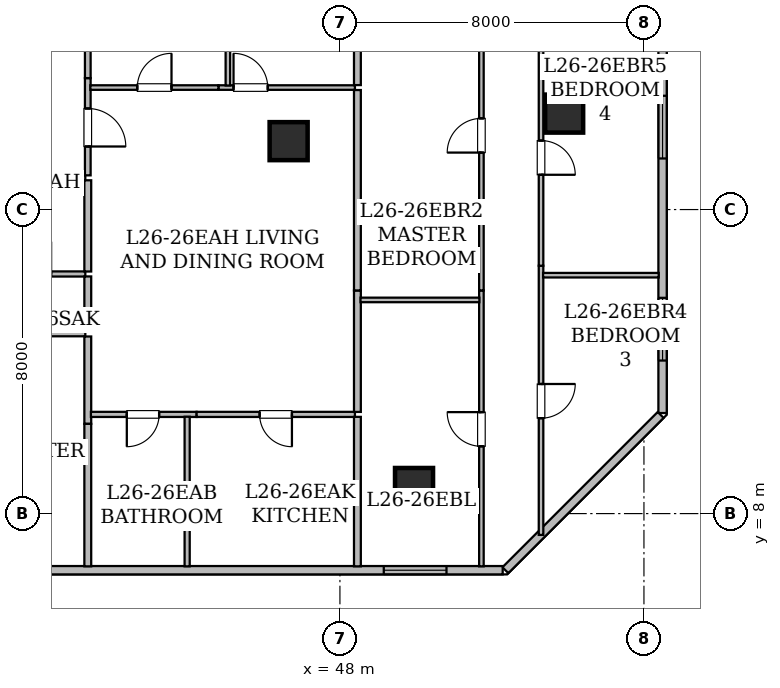
"""IFC4 building model, lengths in metres.
Left out: names, types, materials, properties, quantities, classifications, styles, units other than length and angle.
Written with IfcOpenShell. Run it as: python <this file> out.ifc"""

import sys

from ifc_helpers import new_model, si_unit, direction, frame, frame_2d, origin, origin_2d, place, context, subcontext, project, spatial, rectangle, hollow_rectangle, extrude, element, fill, save


model = new_model("IFC4")
c1 = context("Model", 3, precision=1e-05, world=origin(), true_north=direction((0.0, 1.0)))
c2 = subcontext(c1, "Body", "Model", "MODEL_VIEW")
j1 = project(units=[si_unit("LENGTHUNIT", "METRE"), si_unit("PLANEANGLEUNIT", "RADIAN")], contexts=[c1])
p1 = place(None, origin())
s1 = spatial("IfcSite", under=j1, at=p1, CompositionType="ELEMENT")
p2 = place(p1, origin())
s2 = spatial("IfcBuilding", under=s1, at=p2, CompositionType="ELEMENT")
p3 = place(p2, frame((0.0, 0.0, 105.55)))
s3 = spatial("IfcBuildingStorey", under=s2, at=p3, CompositionType="ELEMENT", Elevation=105.55)
for number, where, z_axis, x_axis in (
    (1, (49.95, 8.7, 0.0), (0.0, 0.0, 1.0), (1.0, 0.0, 0.0)),
    (2, (53.9, 18.525, 0.0), (0.0, 0.0, 1.0), (1.0, 0.0, 0.0)),
    (3, (46.65, 17.8, 0.0), (0.0, 0.0, 1.0), (1.0, 0.0, 0.0)),
):
    element("IfcColumn", number, at=place(p3, frame(where, z_axis=z_axis, x_axis=x_axis)), inside=s3, PredefinedType="COLUMN", context=c2, shape_type="SweptSolid", body=[
        extrude(hollow_rectangle(XDim=1.0, YDim=1.0, WallThickness=0.05, at=origin_2d()), origin(), (0.0, 0.0, 1.0), 3.65),
    ])
p4 = place(p3, frame((56.49, 24.707, 0.0), z_axis=(0.0, 0.0, 1.0), x_axis=(0.0, -1.0, 0.0)))
e4 = element("IfcWall", 4, at=p4, inside=s3, PredefinedType="STANDARD", context=c2, shape_type="SweptSolid", body=[
    extrude(rectangle(XDim=14.061, YDim=0.22, at=frame_2d((7.031, 0.0))), origin(), (0.0, 0.0, 1.0), 3.43),
])
p5 = place(p4, frame((11.03, 0.0, 0.85)))
e5 = element("IfcOpeningElement", 5, at=p5, cuts=e4, PredefinedType="OPENING", context=c2, shape_type="SweptSolid", body=[
    extrude(rectangle(XDim=1.65, YDim=1.55, at=frame_2d((0.825, 0.775))), frame((0.0, 0.12, 0.0), z_axis=(0.0, -1.0, 0.0), x_axis=(1.0, 0.0, 0.0)), (0.0, 0.0, 1.0), 0.24),
])
p6 = place(p4, frame((5.713, 0.0, 0.85)))
e6 = element("IfcOpeningElement", 6, at=p6, cuts=e4, PredefinedType="OPENING", context=c2, shape_type="SweptSolid", body=[
    extrude(rectangle(XDim=1.65, YDim=1.55, at=frame_2d((0.825, 0.775))), frame((0.0, 0.12, 0.0), z_axis=(0.0, -1.0, 0.0), x_axis=(1.0, 0.0, 0.0)), (0.0, 0.0, 1.0), 0.24),
])
p7 = place(p4, frame((0.638, 0.0, 0.85)))
e7 = element("IfcOpeningElement", 7, at=p7, cuts=e4, PredefinedType="OPENING", context=c2, shape_type="SweptSolid", body=[
    extrude(rectangle(XDim=1.65, YDim=1.55, at=frame_2d((0.825, 0.775))), frame((0.0, 0.12, 0.0), z_axis=(0.0, -1.0, 0.0), x_axis=(1.0, 0.0, 0.0)), (0.0, 0.0, 1.0), 0.24),
])
p8 = place(p3, frame((56.44, 10.596, 0.0), z_axis=(0.0, 0.0, 1.0), x_axis=(-0.707106781187, -0.707106781187, 0.0)))
e8 = element("IfcWall", 8, at=p8, inside=s3, PredefinedType="STANDARD", context=c2, shape_type="SweptSolid", body=[
    extrude(rectangle(XDim=5.778, YDim=0.22, at=frame_2d((2.889, 0.0))), origin(), (0.0, 0.0, 1.0), 3.43),
])
p9 = place(p3, frame((52.283, 6.51, 0.0), z_axis=(0.0, 0.0, 1.0), x_axis=(-1.0, 0.0, 0.0)))
e9 = element("IfcWall", 9, at=p9, inside=s3, PredefinedType="STANDARD", context=c2, shape_type="SweptSolid", body=[
    extrude(rectangle(XDim=38.568, YDim=0.22, at=frame_2d((19.284, 0.0))), origin(), (0.0, 0.0, 1.0), 3.43),
])
p10 = place(p9, frame((21.108, 0.0, 0.85)))
e10 = element("IfcOpeningElement", 10, at=p10, cuts=e9, PredefinedType="OPENING", context=c2, shape_type="SweptSolid", body=[
    extrude(rectangle(XDim=1.65, YDim=1.55, at=frame_2d((0.825, 0.775))), frame((0.0, 0.12, 0.0), z_axis=(0.0, -1.0, 0.0), x_axis=(1.0, 0.0, 0.0)), (0.0, 0.0, 1.0), 0.24),
])
p11 = place(p9, frame((35.355, 0.0, 0.85)))
e11 = element("IfcOpeningElement", 11, at=p11, cuts=e9, PredefinedType="OPENING", context=c2, shape_type="SweptSolid", body=[
    extrude(rectangle(XDim=1.65, YDim=1.55, at=frame_2d((0.825, 0.775))), frame((0.0, 0.12, 0.0), z_axis=(0.0, -1.0, 0.0), x_axis=(1.0, 0.0, 0.0)), (0.0, 0.0, 1.0), 0.24),
])
p12 = place(p9, frame((29.413, 0.0, 0.8)))
e12 = element("IfcOpeningElement", 12, at=p12, cuts=e9, PredefinedType="OPENING", context=c2, shape_type="SweptSolid", body=[
    extrude(rectangle(XDim=1.2, YDim=1.5, at=frame_2d((0.6, 0.75))), frame((0.0, 0.12, 0.0), z_axis=(0.0, -1.0, 0.0), x_axis=(1.0, 0.0, 0.0)), (0.0, 0.0, 1.0), 0.24),
])
p13 = place(p9, frame((31.863, 0.0, 0.85)))
e13 = element("IfcOpeningElement", 13, at=p13, cuts=e9, PredefinedType="OPENING", context=c2, shape_type="SweptSolid", body=[
    extrude(rectangle(XDim=1.65, YDim=1.55, at=frame_2d((0.825, 0.775))), frame((0.0, 0.12, 0.0), z_axis=(0.0, -1.0, 0.0), x_axis=(1.0, 0.0, 0.0)), (0.0, 0.0, 1.0), 0.24),
])
p14 = place(p9, frame((26.513, 0.0, 0.85)))
e14 = element("IfcOpeningElement", 14, at=p14, cuts=e9, PredefinedType="OPENING", context=c2, shape_type="SweptSolid", body=[
    extrude(rectangle(XDim=1.65, YDim=1.55, at=frame_2d((0.825, 0.775))), frame((0.0, 0.12, 0.0), z_axis=(0.0, -1.0, 0.0), x_axis=(1.0, 0.0, 0.0)), (0.0, 0.0, 1.0), 0.24),
])
p15 = place(p9, frame((13.843, 0.0, 0.85)))
e15 = element("IfcOpeningElement", 15, at=p15, cuts=e9, PredefinedType="OPENING", context=c2, shape_type="SweptSolid", body=[
    extrude(rectangle(XDim=1.65, YDim=1.55, at=frame_2d((0.825, 0.775))), frame((0.0, 0.12, 0.0), z_axis=(0.0, -1.0, 0.0), x_axis=(1.0, 0.0, 0.0)), (0.0, 0.0, 1.0), 0.24),
])
p16 = place(p9, frame((1.479, 0.0, 0.85)))
e16 = element("IfcOpeningElement", 16, at=p16, cuts=e9, PredefinedType="OPENING", context=c2, shape_type="SweptSolid", body=[
    extrude(rectangle(XDim=1.65, YDim=1.55, at=frame_2d((0.825, 0.775))), frame((0.0, 0.12, 0.0), z_axis=(0.0, -1.0, 0.0), x_axis=(1.0, 0.0, 0.0)), (0.0, 0.0, 1.0), 0.24),
])
p17 = place(p3, frame((41.3, 16.835, 0.0), z_axis=(0.0, 0.0, 1.0), x_axis=(-1.0, 0.0, 0.0)))
e17 = element("IfcWall", 17, at=p17, inside=s3, PredefinedType="STANDARD", context=c2, shape_type="SweptSolid", body=[
    extrude(rectangle(XDim=2.336, YDim=0.15, at=frame_2d((1.168, 0.0))), origin(), (0.0, 0.0, 1.0), 2.647),
])
p18 = place(p3, frame((41.365, 19.459, 0.0), z_axis=(0.0, 0.0, 1.0), x_axis=(0.0, -1.0, 0.0)))
e18 = element("IfcWall", 18, at=p18, inside=s3, PredefinedType="STANDARD", context=c2, shape_type="SweptSolid", body=[
    extrude(rectangle(XDim=2.559, YDim=0.15, at=frame_2d((1.28, 0.0))), origin(), (0.0, 0.0, 1.0), 2.647),
])
p19 = place(p18, frame((0.8, 0.0, 0.0)))
e19 = element("IfcOpeningElement", 19, at=p19, cuts=e18, PredefinedType="OPENING", context=c2, shape_type="SweptSolid", body=[
    extrude(rectangle(XDim=1.0, YDim=2.15, at=frame_2d((0.5, 1.075))), frame((0.0, 0.085, 0.0), z_axis=(0.0, -1.0, 0.0), x_axis=(1.0, 0.0, 0.0)), (0.0, 0.0, 1.0), 0.17),
])
p20 = place(p3, frame((41.365, 32.048, 0.0), z_axis=(0.0, 0.0, 1.0), x_axis=(0.0, -1.0, 0.0)))
e20 = element("IfcWall", 20, at=p20, inside=s3, PredefinedType="STANDARD", context=c2, shape_type="SweptSolid", body=[
    extrude(rectangle(XDim=12.589, YDim=0.15, at=frame_2d((6.294, 0.0))), origin(), (0.0, 0.0, 1.0), 2.961),
])
p21 = place(p3, frame((38.65, 14.305, 0.0), z_axis=(0.0, 0.0, 1.0), x_axis=(1.0, 0.0, 0.0)))
e21 = element("IfcWall", 21, at=p21, inside=s3, PredefinedType="PARTITIONING", context=c2, shape_type="SweptSolid", body=[
    extrude(rectangle(XDim=2.65, YDim=0.135, at=frame_2d((1.325, 0.0))), origin(), (0.0, 0.0, 1.0), 2.647),
])
p22 = place(p21, frame((0.9, 0.0, 0.0)))
e22 = element("IfcOpeningElement", 22, at=p22, cuts=e21, PredefinedType="OPENING", context=c2, shape_type="SweptSolid", body=[
    extrude(rectangle(XDim=0.85, YDim=2.1, at=frame_2d((0.425, 1.05))), frame((0.0, 0.077, 0.0), z_axis=(0.0, -1.0, 0.0), x_axis=(1.0, 0.0, 0.0)), (0.0, 0.0, 1.0), 0.155),
])
p23 = place(p3, frame((41.3, 12.725, 0.0), z_axis=(0.0, 0.0, 1.0), x_axis=(-1.0, 0.0, 0.0)))
e23 = element("IfcWall", 23, at=p23, inside=s3, PredefinedType="PARTITIONING", context=c2, shape_type="SweptSolid", body=[
    extrude(rectangle(XDim=7.381, YDim=0.12, at=frame_2d((3.69, 0.0))), origin(), (0.0, 0.0, 1.0), 2.647),
])
p24 = place(p23, frame((3.24, 0.0, 0.0)))
e24 = element("IfcOpeningElement", 24, at=p24, cuts=e23, PredefinedType="OPENING", context=c2, shape_type="SweptSolid", body=[
    extrude(rectangle(XDim=0.9, YDim=2.1, at=frame_2d((0.45, 1.05))), frame((0.0, 0.07, 0.0), z_axis=(0.0, -1.0, 0.0), x_axis=(1.0, 0.0, 0.0)), (0.0, 0.0, 1.0), 0.14),
])
p25 = place(p3, frame((41.365, 14.24, 0.0), z_axis=(0.0, 0.0, 1.0), x_axis=(0.0, -1.0, 0.0)))
e25 = element("IfcWall", 25, at=p25, inside=s3, PredefinedType="STANDARD", context=c2, shape_type="SweptSolid", body=[
    extrude(rectangle(XDim=1.45, YDim=0.18, at=frame_2d((0.725, 0.0))), origin(), (0.0, 0.0, 1.0), 3.43),
])
p26 = place(p3, frame((41.365, 16.77, 0.0), z_axis=(0.0, 0.0, 1.0), x_axis=(0.0, -1.0, 0.0)))
e26 = element("IfcWall", 26, at=p26, inside=s3, PredefinedType="STANDARD", context=c2, shape_type="SweptSolid", body=[
    extrude(rectangle(XDim=2.4, YDim=0.18, at=frame_2d((1.2, 0.0))), origin(), (0.0, 0.0, 1.0), 3.43),
])
p27 = place(p3, frame((41.365, 12.66, 0.0), z_axis=(0.0, 0.0, 1.0), x_axis=(0.0, -1.0, 0.0)))
e27 = element("IfcWall", 27, at=p27, inside=s3, PredefinedType="STANDARD", context=c2, shape_type="SweptSolid", body=[
    extrude(rectangle(XDim=2.299, YDim=0.18, at=frame_2d((1.149, 0.0))), origin(), (0.0, 0.0, 1.0), 3.43),
])
p28 = place(p3, frame((41.365, 10.361, 0.0), z_axis=(0.0, 0.0, 1.0), x_axis=(0.0, -1.0, 0.0)))
e28 = element("IfcWall", 28, at=p28, inside=s3, PredefinedType="STANDARD", context=c2, shape_type="SweptSolid", body=[
    extrude(rectangle(XDim=3.749, YDim=0.18, at=frame_2d((1.875, 0.0))), origin(), (0.0, 0.0, 1.0), 2.876),
])
p29 = place(p3, frame((44.803, 19.21, 0.0), z_axis=(0.0, 0.0, 1.0), x_axis=(1.0, 0.0, 0.0)))
e29 = element("IfcWall", 29, at=p29, inside=s3, PredefinedType="PARTITIONING", context=c2, shape_type="SweptSolid", body=[
    extrude(rectangle(XDim=3.592, YDim=0.12, at=frame_2d((1.796, 0.0))), origin(), (0.0, 0.0, 1.0), 2.647),
])
p30 = place(p29, frame((0.397, 0.0, 0.0)))
e30 = element("IfcOpeningElement", 30, at=p30, cuts=e29, PredefinedType="OPENING", context=c2, shape_type="SweptSolid", body=[
    extrude(rectangle(XDim=0.9, YDim=2.1, at=frame_2d((0.45, 1.05))), frame((0.0, 0.07, 0.0), z_axis=(0.0, -1.0, 0.0), x_axis=(1.0, 0.0, 0.0)), (0.0, 0.0, 1.0), 0.14),
])
p31 = place(p3, frame((44.229, 10.61, 0.0), z_axis=(0.0, 0.0, 1.0), x_axis=(-1.0, 0.0, 0.0)))
e31 = element("IfcWall", 31, at=p31, inside=s3, PredefinedType="PARTITIONING", context=c2, shape_type="SweptSolid", body=[
    extrude(rectangle(XDim=2.782, YDim=0.135, at=frame_2d((1.391, 0.0))), origin(), (0.0, 0.0, 1.0), 3.43),
])
p32 = place(p31, frame((0.987, 0.0, 0.0)))
e32 = element("IfcOpeningElement", 32, at=p32, cuts=e31, PredefinedType="OPENING", context=c2, shape_type="SweptSolid", body=[
    extrude(rectangle(XDim=0.85, YDim=2.1, at=frame_2d((0.425, 1.05))), frame((0.0, 0.077, 0.0), z_axis=(0.0, -1.0, 0.0), x_axis=(1.0, 0.0, 0.0)), (0.0, 0.0, 1.0), 0.155),
])
p33 = place(p3, frame((48.395, 10.61, 0.0), z_axis=(0.0, 0.0, 1.0), x_axis=(-1.0, 0.0, 0.0)))
e33 = element("IfcWall", 33, at=p33, inside=s3, PredefinedType="PARTITIONING", context=c2, shape_type="SweptSolid", body=[
    extrude(rectangle(XDim=4.166, YDim=0.135, at=frame_2d((2.083, 0.0))), origin(), (0.0, 0.0, 1.0), 3.43),
])
p34 = place(p33, frame((1.658, 0.0, 0.0)))
e34 = element("IfcOpeningElement", 34, at=p34, cuts=e33, PredefinedType="OPENING", context=c2, shape_type="SweptSolid", body=[
    extrude(rectangle(XDim=0.85, YDim=2.1, at=frame_2d((0.425, 1.05))), frame((0.0, 0.077, 0.0), z_axis=(0.0, -1.0, 0.0), x_axis=(1.0, 0.0, 0.0)), (0.0, 0.0, 1.0), 0.155),
])
p35 = place(p3, frame((41.432, 19.21, 0.0), z_axis=(0.0, 0.0, 1.0), x_axis=(1.0, 0.0, 0.0)))
e35 = element("IfcWall", 35, at=p35, inside=s3, PredefinedType="PARTITIONING", context=c2, shape_type="SweptSolid", body=[
    extrude(rectangle(XDim=3.371, YDim=0.12, at=frame_2d((1.686, 0.0))), origin(), (0.0, 0.0, 1.0), 3.43),
])
p36 = place(p35, frame((1.236, 0.0, 0.0)))
e36 = element("IfcOpeningElement", 36, at=p36, cuts=e35, PredefinedType="OPENING", context=c2, shape_type="SweptSolid", body=[
    extrude(rectangle(XDim=0.9, YDim=2.1, at=frame_2d((0.45, 1.05))), frame((0.0, 0.07, 0.0), z_axis=(0.0, -1.0, 0.0), x_axis=(1.0, 0.0, 0.0)), (0.0, 0.0, 1.0), 0.14),
])
p37 = place(p3, frame((48.46, 13.871, 0.0), z_axis=(0.0, 0.0, 1.0), x_axis=(0.0, -1.0, 0.0)))
e37 = element("IfcWall", 37, at=p37, inside=s3, PredefinedType="STANDARD", context=c2, shape_type="SweptSolid", body=[
    extrude(rectangle(XDim=3.196, YDim=0.18, at=frame_2d((1.598, 0.0))), origin(), (0.0, 0.0, 1.0), 2.647),
])
p38 = place(p3, frame((48.46, 19.145, 0.0), z_axis=(0.0, 0.0, 1.0), x_axis=(0.0, -1.0, 0.0)))
e38 = element("IfcWall", 38, at=p38, inside=s3, PredefinedType="STANDARD", context=c2, shape_type="SweptSolid", body=[
    extrude(rectangle(XDim=5.274, YDim=0.18, at=frame_2d((2.637, 0.0))), origin(), (0.0, 0.0, 1.0), 2.647),
])
p39 = place(p3, frame((45.052, 19.264, 0.0), z_axis=(0.0, 0.0, 1.0), x_axis=(0.0, 1.0, 0.0)))
e39 = element("IfcWall", 39, at=p39, inside=s3, PredefinedType="PARTITIONING", context=c2, shape_type="SweptSolid", body=[
    extrude(rectangle(XDim=12.654, YDim=0.12, at=frame_2d((6.327, 0.0))), origin(), (0.0, 0.0, 1.0), 2.961),
])
p40 = place(p3, frame((48.46, 22.07, 0.0), z_axis=(0.0, 0.0, 1.0), x_axis=(0.0, -1.0, 0.0)))
e40 = element("IfcWall", 40, at=p40, inside=s3, PredefinedType="STANDARD", context=c2, shape_type="SweptSolid", body=[
    extrude(rectangle(XDim=2.795, YDim=0.18, at=frame_2d((1.397, 0.0))), origin(), (0.0, 0.0, 1.0), 3.43),
])
p41 = place(p3, frame((43.98, 10.548, 0.0), z_axis=(0.0, 0.0, 1.0), x_axis=(0.0, -1.0, 0.0)))
e41 = element("IfcWall", 41, at=p41, inside=s3, PredefinedType="PARTITIONING", context=c2, shape_type="SweptSolid", body=[
    extrude(rectangle(XDim=3.936, YDim=0.135, at=frame_2d((1.968, 0.0))), origin(), (0.0, 0.0, 1.0), 2.876),
])
p42 = place(p3, frame((48.46, 10.545, 0.0), z_axis=(0.0, 0.0, 1.0), x_axis=(0.0, -1.0, 0.0)))
e42 = element("IfcWall", 42, at=p42, inside=s3, PredefinedType="STANDARD", context=c2, shape_type="SweptSolid", body=[
    extrude(rectangle(XDim=3.933, YDim=0.18, at=frame_2d((1.966, 0.0))), origin(), (0.0, 0.0, 1.0), 2.876),
])
p43 = place(p3, frame((51.723, 6.612, 0.0), z_axis=(0.0, 0.0, 1.0), x_axis=(0.0, 1.0, 0.0)))
e43 = element("IfcWall", 43, at=p43, inside=s3, PredefinedType="PARTITIONING", context=c2, shape_type="SweptSolid", body=[
    extrude(rectangle(XDim=7.259, YDim=0.12, at=frame_2d((3.629, 0.0))), origin(), (0.0, 0.0, 1.0), 2.876),
])
p44 = place(p43, frame((3.158, 0.0, 0.0)))
e44 = element("IfcOpeningElement", 44, at=p44, cuts=e43, PredefinedType="OPENING", context=c2, shape_type="SweptSolid", body=[
    extrude(rectangle(XDim=0.9, YDim=2.1, at=frame_2d((0.45, 1.05))), frame((0.0, 0.07, 0.0), z_axis=(0.0, -1.0, 0.0), x_axis=(1.0, 0.0, 0.0)), (0.0, 0.0, 1.0), 0.14),
])
p45 = place(p3, frame((51.723, 13.871, 0.0), z_axis=(0.0, 0.0, 1.0), x_axis=(0.0, 1.0, 0.0)))
e45 = element("IfcWall", 45, at=p45, inside=s3, PredefinedType="PARTITIONING", context=c2, shape_type="SweptSolid", body=[
    extrude(rectangle(XDim=8.199, YDim=0.12, at=frame_2d((4.1, 0.0))), origin(), (0.0, 0.0, 1.0), 2.647),
])
p46 = place(p45, frame((3.628, 0.0, 0.0)))
e46 = element("IfcOpeningElement", 46, at=p46, cuts=e45, PredefinedType="OPENING", context=c2, shape_type="SweptSolid", body=[
    extrude(rectangle(XDim=0.9, YDim=2.1, at=frame_2d((0.45, 1.05))), frame((0.0, 0.07, 0.0), z_axis=(0.0, -1.0, 0.0), x_axis=(1.0, 0.0, 0.0)), (0.0, 0.0, 1.0), 0.14),
])
p47 = place(p3, frame((53.292, 14.522, 0.0), z_axis=(0.0, 0.0, 1.0), x_axis=(0.0, -1.0, 0.0)))
e47 = element("IfcWall", 47, at=p47, inside=s3, PredefinedType="PARTITIONING", context=c2, shape_type="SweptSolid", body=[
    extrude(rectangle(XDim=7.083, YDim=0.12, at=frame_2d((3.542, 0.0))), origin(), (0.0, 0.0, 1.0), 3.43),
])
p48 = place(p47, frame((3.112, 0.0, 0.0)))
e48 = element("IfcOpeningElement", 48, at=p48, cuts=e47, PredefinedType="OPENING", context=c2, shape_type="SweptSolid", body=[
    extrude(rectangle(XDim=0.9, YDim=2.1, at=frame_2d((0.45, 1.05))), frame((0.0, 0.07, 0.0), z_axis=(0.0, -1.0, 0.0), x_axis=(1.0, 0.0, 0.0)), (0.0, 0.0, 1.0), 0.14),
])
p49 = place(p3, frame((53.292, 22.315, 0.0), z_axis=(0.0, 0.0, 1.0), x_axis=(0.0, -1.0, 0.0)))
e49 = element("IfcWall", 49, at=p49, inside=s3, PredefinedType="PARTITIONING", context=c2, shape_type="SweptSolid", body=[
    extrude(rectangle(XDim=7.793, YDim=0.12, at=frame_2d((3.896, 0.0))), origin(), (0.0, 0.0, 1.0), 2.647),
])
p50 = place(p49, frame((4.5, 0.0, 0.0)))
e50 = element("IfcOpeningElement", 50, at=p50, cuts=e49, PredefinedType="OPENING", context=c2, shape_type="SweptSolid", body=[
    extrude(rectangle(XDim=0.9, YDim=2.1, at=frame_2d((0.45, 1.05))), frame((0.0, 0.07, 0.0), z_axis=(0.0, -1.0, 0.0), x_axis=(1.0, 0.0, 0.0)), (0.0, 0.0, 1.0), 0.14),
])
p51 = place(p3, frame((48.542, 13.622, 0.0), z_axis=(0.0, 0.0, 1.0), x_axis=(1.0, 0.0, 0.0)))
e51 = element("IfcWall", 51, at=p51, inside=s3, PredefinedType="PARTITIONING", context=c2, shape_type="SweptSolid", body=[
    extrude(rectangle(XDim=3.127, YDim=0.12, at=frame_2d((1.563, 0.0))), origin(), (0.0, 0.0, 1.0), 3.43),
])
p52 = place(p3, frame((53.346, 14.273, 0.0), z_axis=(0.0, 0.0, 1.0), x_axis=(1.0, 0.0, 0.0)))
e52 = element("IfcWall", 52, at=p52, inside=s3, PredefinedType="PARTITIONING", context=c2, shape_type="SweptSolid", body=[
    extrude(rectangle(XDim=3.042, YDim=0.12, at=frame_2d((1.521, 0.0))), origin(), (0.0, 0.0, 1.0), 3.43),
])
p53 = place(p16, origin())
e53 = element("IfcWindow", 53, at=p53, inside=s3, PartitioningType="SINGLE_PANEL", PredefinedType="WINDOW", context=c2, shape_type="SweptSolid", body=[
    extrude(rectangle(XDim=1.65, YDim=1.55, at=frame_2d((0.825, 0.775))), frame((0.0, 0.03, 0.0), z_axis=(0.0, -1.0, 0.0), x_axis=(1.0, 0.0, 0.0)), (0.0, 0.0, 1.0), 0.06),
])
fill(e16, e53)
p54 = place(p5, origin())
e54 = element("IfcWindow", 54, at=p54, inside=s3, PartitioningType="SINGLE_PANEL", PredefinedType="WINDOW", context=c2, shape_type="SweptSolid", body=[
    extrude(rectangle(XDim=1.65, YDim=1.55, at=frame_2d((0.825, 0.775))), frame((0.0, 0.03, 0.0), z_axis=(0.0, -1.0, 0.0), x_axis=(1.0, 0.0, 0.0)), (0.0, 0.0, 1.0), 0.06),
])
fill(e5, e54)
p55 = place(p6, origin())
e55 = element("IfcWindow", 55, at=p55, inside=s3, PartitioningType="SINGLE_PANEL", PredefinedType="WINDOW", context=c2, shape_type="SweptSolid", body=[
    extrude(rectangle(XDim=1.65, YDim=1.55, at=frame_2d((0.825, 0.775))), frame((0.0, 0.03, 0.0), z_axis=(0.0, -1.0, 0.0), x_axis=(1.0, 0.0, 0.0)), (0.0, 0.0, 1.0), 0.06),
])
fill(e6, e55)
p56 = place(p19, origin())
e56 = element("IfcDoor", 56, at=p56, inside=s3, OperationType="SINGLE_SWING_RIGHT", PredefinedType="DOOR", context=c2, shape_type="SweptSolid", body=[
    extrude(rectangle(XDim=1.0, YDim=2.15, at=frame_2d((0.5, 1.075))), frame((0.0, 0.025, 0.0), z_axis=(0.0, -1.0, 0.0), x_axis=(1.0, 0.0, 0.0)), (0.0, 0.0, 1.0), 0.05),
])
fill(e19, e56)
p57 = place(p30, origin())
e57 = element("IfcDoor", 57, at=p57, inside=s3, OperationType="SINGLE_SWING_LEFT", PredefinedType="DOOR", context=c2, shape_type="SweptSolid", body=[
    extrude(rectangle(XDim=0.9, YDim=2.1, at=frame_2d((0.45, 1.05))), frame((0.0, 0.025, 0.0), z_axis=(0.0, -1.0, 0.0), x_axis=(1.0, 0.0, 0.0)), (0.0, 0.0, 1.0), 0.05),
])
fill(e30, e57)
p58 = place(p32, origin())
e58 = element("IfcDoor", 58, at=p58, inside=s3, OperationType="SINGLE_SWING_RIGHT", PredefinedType="DOOR", context=c2, shape_type="SweptSolid", body=[
    extrude(rectangle(XDim=0.85, YDim=2.1, at=frame_2d((0.425, 1.05))), frame((0.0, 0.025, 0.0), z_axis=(0.0, -1.0, 0.0), x_axis=(1.0, 0.0, 0.0)), (0.0, 0.0, 1.0), 0.05),
])
fill(e32, e58)
p59 = place(p34, origin())
e59 = element("IfcDoor", 59, at=p59, inside=s3, OperationType="SINGLE_SWING_LEFT", PredefinedType="DOOR", context=c2, shape_type="SweptSolid", body=[
    extrude(rectangle(XDim=0.85, YDim=2.1, at=frame_2d((0.425, 1.05))), frame((0.0, 0.025, 0.0), z_axis=(0.0, -1.0, 0.0), x_axis=(1.0, 0.0, 0.0)), (0.0, 0.0, 1.0), 0.05),
])
fill(e34, e59)
p60 = place(p36, origin())
e60 = element("IfcDoor", 60, at=p60, inside=s3, OperationType="SINGLE_SWING_RIGHT", PredefinedType="DOOR", context=c2, shape_type="SweptSolid", body=[
    extrude(rectangle(XDim=0.9, YDim=2.1, at=frame_2d((0.45, 1.05))), frame((0.0, 0.025, 0.0), z_axis=(0.0, -1.0, 0.0), x_axis=(1.0, 0.0, 0.0)), (0.0, 0.0, 1.0), 0.05),
])
fill(e36, e60)
p61 = place(p44, origin())
e61 = element("IfcDoor", 61, at=p61, inside=s3, OperationType="SINGLE_SWING_RIGHT", PredefinedType="DOOR", context=c2, shape_type="SweptSolid", body=[
    extrude(rectangle(XDim=0.9, YDim=2.1, at=frame_2d((0.45, 1.05))), frame((0.0, 0.025, 0.0), z_axis=(0.0, -1.0, 0.0), x_axis=(1.0, 0.0, 0.0)), (0.0, 0.0, 1.0), 0.05),
])
fill(e44, e61)
p62 = place(p46, origin())
e62 = element("IfcDoor", 62, at=p62, inside=s3, OperationType="SINGLE_SWING_LEFT", PredefinedType="DOOR", context=c2, shape_type="SweptSolid", body=[
    extrude(rectangle(XDim=0.9, YDim=2.1, at=frame_2d((0.45, 1.05))), frame((0.0, 0.025, 0.0), z_axis=(0.0, -1.0, 0.0), x_axis=(1.0, 0.0, 0.0)), (0.0, 0.0, 1.0), 0.05),
])
fill(e46, e62)
p63 = place(p48, origin())
e63 = element("IfcDoor", 63, at=p63, inside=s3, OperationType="SINGLE_SWING_LEFT", PredefinedType="DOOR", context=c2, shape_type="SweptSolid", body=[
    extrude(rectangle(XDim=0.9, YDim=2.1, at=frame_2d((0.45, 1.05))), frame((0.0, 0.025, 0.0), z_axis=(0.0, -1.0, 0.0), x_axis=(1.0, 0.0, 0.0)), (0.0, 0.0, 1.0), 0.05),
])
fill(e48, e63)
p64 = place(p50, origin())
e64 = element("IfcDoor", 64, at=p64, inside=s3, OperationType="SINGLE_SWING_RIGHT", PredefinedType="DOOR", context=c2, shape_type="SweptSolid", body=[
    extrude(rectangle(XDim=0.9, YDim=2.1, at=frame_2d((0.45, 1.05))), frame((0.0, 0.025, 0.0), z_axis=(0.0, -1.0, 0.0), x_axis=(1.0, 0.0, 0.0)), (0.0, 0.0, 1.0), 0.05),
])
fill(e50, e64)
save(model, sys.argv[1])
